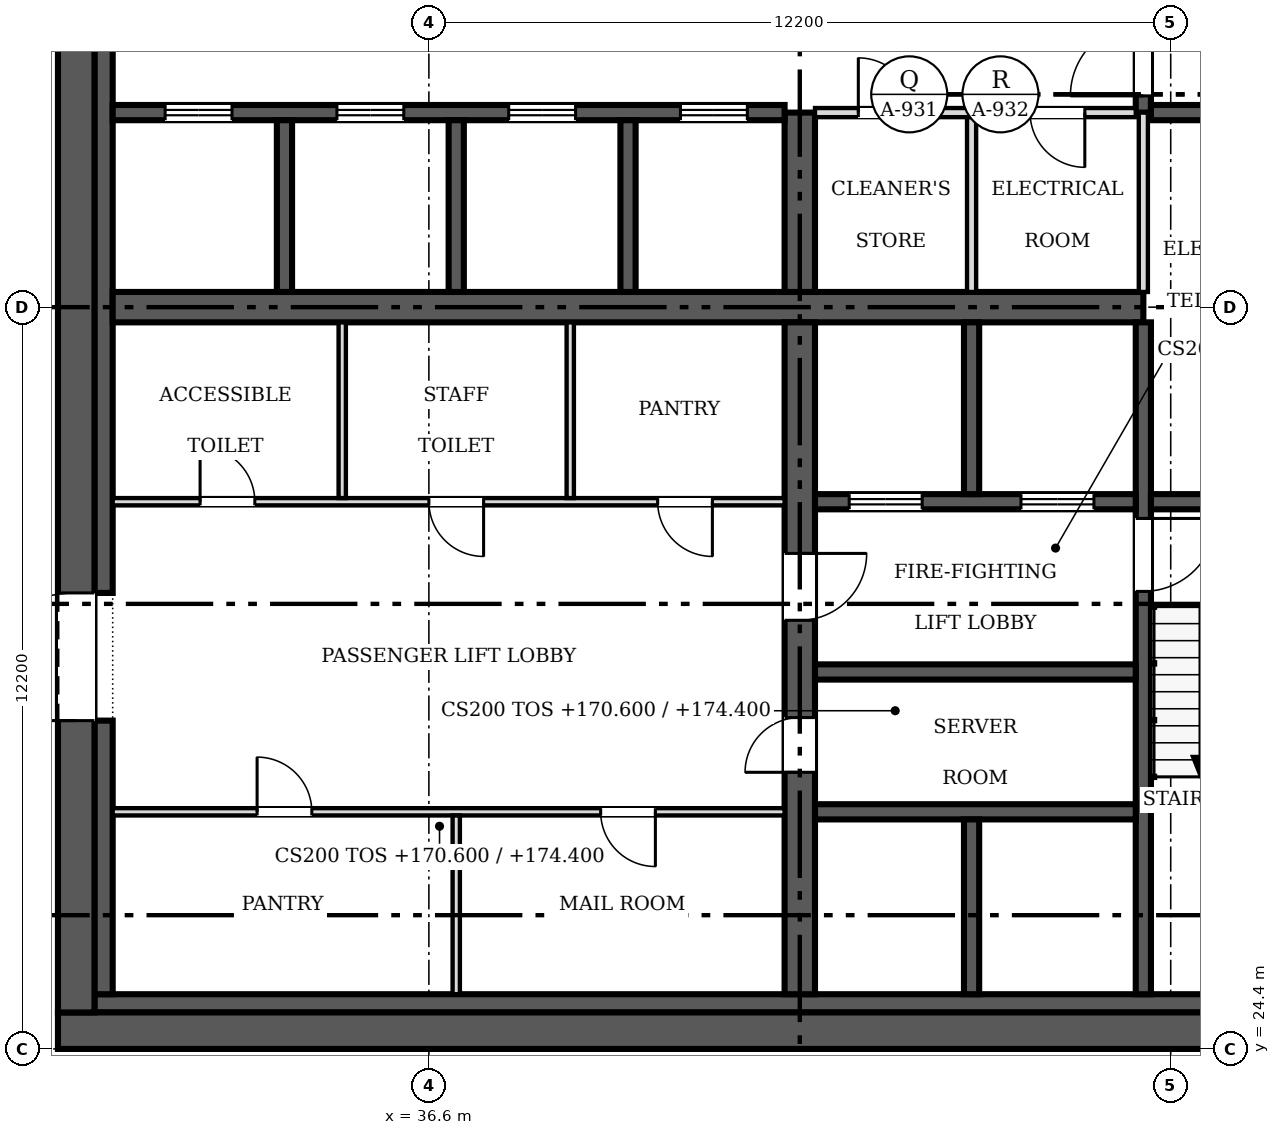
"""IFC4 building model, lengths in metres.
Left out: names, types, materials, properties, quantities, classifications, styles, units other than length and angle.
Written with IfcOpenShell. Run it as: python <this file> out.ifc"""

import sys

from ifc_helpers import new_model, si_unit, direction, frame, frame_2d, origin, place, context, subcontext, project, spatial, rectangle, extrude, source, transform, mapped, element, fill, save


model = new_model("IFC4")
c1 = context("Model", 3, precision=1e-05, world=origin(), true_north=direction((0.0, 1.0)))
c2 = subcontext(c1, "Body", "Model", "MODEL_VIEW")
j1 = project(units=[si_unit("LENGTHUNIT", "METRE"), si_unit("PLANEANGLEUNIT", "RADIAN")], contexts=[c1])
p1 = place(None, origin())
s1 = spatial("IfcSite", under=j1, at=p1, CompositionType="ELEMENT")
p2 = place(p1, origin())
s2 = spatial("IfcBuilding", under=s1, at=p2, CompositionType="ELEMENT")
p3 = place(p2, frame((0.0, 0.0, 170.6)))
s3 = spatial("IfcBuildingStorey", under=s2, at=p3, CompositionType="ELEMENT", Elevation=170.6)
p4 = place(p3, frame((54.9, 24.7, 0.0), z_axis=(0.0, 0.0, 1.0), x_axis=(-1.0, 0.0, 0.0)))
e1 = element("IfcWall", 1, at=p4, inside=s3, PredefinedType="SHEAR", context=c2, shape_type="SweptSolid", body=[
    extrude(rectangle(XDim=24.4, YDim=0.6, at=frame_2d((12.2, 0.0))), origin(), (0.0, 0.0, 1.0), 3.8),
])
m1 = source(origin(), c2, "Body", "SweptSolid", [
    extrude(rectangle(XDim=1.2, YDim=2.1, at=frame_2d((0.6, 1.05))), frame((0.0, 0.31, 0.0), z_axis=(0.0, -1.0, 0.0), x_axis=(1.0, 0.0, 0.0)), (0.0, 0.0, 1.0), 0.62),
])
p5 = place(p4, frame((1.5, 0.0, 0.0)))
e2 = element("IfcOpeningElement", 2, at=p5, cuts=e1, PredefinedType="OPENING", context=c2, shape_type="MappedRepresentation", body=[
    mapped(m1, transform((0.0, 0.0, 0.0), scale=1.0)),
])
p6 = place(p3, frame((30.8, 25.0, 0.0), z_axis=(0.0, 0.0, 1.0), x_axis=(0.0, 1.0, 0.0)))
e3 = element("IfcWall", 3, at=p6, inside=s3, PredefinedType="SHEAR", context=c2, shape_type="SweptSolid", body=[
    extrude(rectangle(XDim=23.2, YDim=0.6, at=frame_2d((11.6, 0.0))), origin(), (0.0, 0.0, 1.0), 3.8),
])
m2 = source(origin(), c2, "Body", "SweptSolid", [
    extrude(rectangle(XDim=2.1, YDim=2.4, at=frame_2d((1.05, 1.2))), frame((0.0, 0.31, 0.0), z_axis=(0.0, -1.0, 0.0), x_axis=(1.0, 0.0, 0.0)), (0.0, 0.0, 1.0), 0.62),
])
p7 = place(p6, frame((4.8, 0.0, 0.0)))
e4 = element("IfcOpeningElement", 4, at=p7, cuts=e3, PredefinedType="OPENING", context=c2, shape_type="MappedRepresentation", body=[
    mapped(m2, transform((0.0, 0.0, 0.0), scale=1.0)),
])
p8 = place(p6, frame((16.3, 0.0, 0.0)))
e5 = element("IfcOpeningElement", 5, at=p8, cuts=e3, PredefinedType="OPENING", context=c2, shape_type="MappedRepresentation", body=[
    mapped(m2, transform((0.0, 0.0, 0.0), scale=1.0)),
])
p9 = place(p3, frame((31.1, 25.15, 0.0), z_axis=(0.0, 0.0, 1.0), x_axis=(1.0, 0.0, 0.0)))
e6 = element("IfcWall", 6, at=p9, inside=s3, PredefinedType="SOLIDWALL", context=c2, shape_type="SweptSolid", body=[
    extrude(rectangle(XDim=21.1, YDim=0.3, at=frame_2d((10.55, 0.0))), origin(), (0.0, 0.0, 1.0), 3.8),
])
p10 = place(p3, frame((31.25, 25.3, 0.0), z_axis=(0.0, 0.0, 1.0), x_axis=(0.0, 1.0, 0.0)))
e7 = element("IfcWall", 7, at=p10, inside=s3, PredefinedType="SOLIDWALL", context=c2, shape_type="SweptSolid", body=[
    extrude(rectangle(XDim=4.5, YDim=0.3, at=frame_2d((2.25, 0.0))), origin(), (0.0, 0.0, 1.0), 3.8),
])
p11 = place(p3, frame((31.25, 31.9, 0.0), z_axis=(0.0, 0.0, 1.0), x_axis=(0.0, 1.0, 0.0)))
e8 = element("IfcWall", 8, at=p11, inside=s3, PredefinedType="SOLIDWALL", context=c2, shape_type="SweptSolid", body=[
    extrude(rectangle(XDim=9.4, YDim=0.3, at=frame_2d((4.7, 0.0))), origin(), (0.0, 0.0, 1.0), 3.8),
])
p12 = place(p3, frame((31.4, 36.6, 0.0), z_axis=(0.0, 0.0, 1.0), x_axis=(1.0, 0.0, 0.0)))
e9 = element("IfcWall", 9, at=p12, inside=s3, PredefinedType="SHEAR", context=c2, shape_type="SweptSolid", body=[
    extrude(rectangle(XDim=16.95, YDim=0.5, at=frame_2d((8.475, 0.0))), origin(), (0.0, 0.0, 1.0), 3.8),
])
p13 = place(p3, frame((42.7, 36.35, 0.0), z_axis=(0.0, 0.0, 1.0), x_axis=(0.0, -1.0, 0.0)))
e10 = element("IfcWall", 10, at=p13, inside=s3, PredefinedType="SHEAR", context=c2, shape_type="SweptSolid", body=[
    extrude(rectangle(XDim=11.05, YDim=0.5, at=frame_2d((5.525, 0.0))), origin(), (0.0, 0.0, 1.0), 3.8),
])
m3 = source(origin(), c2, "Body", "SweptSolid", [
    extrude(rectangle(XDim=0.9, YDim=2.1, at=frame_2d((0.45, 1.05))), frame((0.0, 0.26, 0.0), z_axis=(0.0, -1.0, 0.0), x_axis=(1.0, 0.0, 0.0)), (0.0, 0.0, 1.0), 0.52),
])
p14 = place(p13, frame((6.5, 0.0, 0.0)))
e11 = element("IfcOpeningElement", 11, at=p14, cuts=e10, PredefinedType="OPENING", context=c2, shape_type="MappedRepresentation", body=[
    mapped(m3, transform((0.0, 0.0, 0.0), scale=1.0)),
])
m4 = source(origin(), c2, "Body", "SweptSolid", [
    extrude(rectangle(XDim=1.1, YDim=2.1, at=frame_2d((0.55, 1.05))), frame((0.0, 0.26, 0.0), z_axis=(0.0, -1.0, 0.0), x_axis=(1.0, 0.0, 0.0)), (0.0, 0.0, 1.0), 0.52),
])
p15 = place(p13, frame((3.8, 0.0, 0.0)))
e12 = element("IfcOpeningElement", 12, at=p15, cuts=e10, PredefinedType="OPENING", context=c2, shape_type="MappedRepresentation", body=[
    mapped(m4, transform((0.0, 0.0, 0.0), scale=1.0)),
])
p16 = place(p3, frame((42.7, 36.85, 0.0), z_axis=(0.0, 0.0, 1.0), x_axis=(0.0, 1.0, 0.0)))
e13 = element("IfcWall", 13, at=p16, inside=s3, PredefinedType="SHEAR", context=c2, shape_type="SweptSolid", body=[
    extrude(rectangle(XDim=2.95, YDim=0.5, at=frame_2d((1.475, 0.0))), origin(), (0.0, 0.0, 1.0), 3.8),
])
p17 = place(p3, frame((31.4, 39.8, 0.0), z_axis=(0.0, 0.0, 1.0), x_axis=(1.0, 0.0, 0.0)))
e14 = element("IfcWall", 14, at=p17, inside=s3, PredefinedType="SOLIDWALL", context=c2, shape_type="SweptSolid", body=[
    extrude(rectangle(XDim=11.05, YDim=0.25, at=frame_2d((5.525, 0.0))), origin(), (0.0, 0.0, 1.0), 3.8),
])
m5 = source(origin(), c2, "Body", "SweptSolid", [
    extrude(rectangle(XDim=1.1, YDim=2.1, at=frame_2d((0.55, 1.05))), frame((0.0, 0.135, 0.0), z_axis=(0.0, -1.0, 0.0), x_axis=(1.0, 0.0, 0.0)), (0.0, 0.0, 1.0), 0.27),
])
p18 = place(p17, frame((0.863, 0.0, 0.0)))
e15 = element("IfcOpeningElement", 15, at=p18, cuts=e14, PredefinedType="OPENING", context=c2, shape_type="MappedRepresentation", body=[
    mapped(m5, transform((0.0, 0.0, 0.0), scale=1.0)),
])
p19 = place(p17, frame((3.688, 0.0, 0.0)))
e16 = element("IfcOpeningElement", 16, at=p19, cuts=e14, PredefinedType="OPENING", context=c2, shape_type="MappedRepresentation", body=[
    mapped(m5, transform((0.0, 0.0, 0.0), scale=1.0)),
])
p20 = place(p17, frame((6.512, 0.0, 0.0)))
e17 = element("IfcOpeningElement", 17, at=p20, cuts=e14, PredefinedType="OPENING", context=c2, shape_type="MappedRepresentation", body=[
    mapped(m5, transform((0.0, 0.0, 0.0), scale=1.0)),
])
p21 = place(p17, frame((9.337, 0.0, 0.0)))
e18 = element("IfcOpeningElement", 18, at=p21, cuts=e14, PredefinedType="OPENING", context=c2, shape_type="MappedRepresentation", body=[
    mapped(m5, transform((0.0, 0.0, 0.0), scale=1.0)),
])
p22 = place(p3, frame((48.35, 36.35, 0.0), z_axis=(0.0, 0.0, 1.0), x_axis=(0.0, -1.0, 0.0)))
e19 = element("IfcWall", 19, at=p22, inside=s3, PredefinedType="SOLIDWALL", context=c2, shape_type="SweptSolid", body=[
    extrude(rectangle(XDim=11.05, YDim=0.25, at=frame_2d((5.525, 0.0))), origin(), (0.0, 0.0, 1.0), 3.8),
])
m6 = source(origin(), c2, "Body", "SweptSolid", [
    extrude(rectangle(XDim=1.2, YDim=2.1, at=frame_2d((0.6, 1.05))), frame((0.0, 0.135, 0.0), z_axis=(0.0, -1.0, 0.0), x_axis=(1.0, 0.0, 0.0)), (0.0, 0.0, 1.0), 0.27),
])
p23 = place(p22, frame((3.225, 0.0, 0.0)))
e20 = element("IfcOpeningElement", 20, at=p23, cuts=e19, PredefinedType="OPENING", context=c2, shape_type="MappedRepresentation", body=[
    mapped(m6, transform((0.0, 0.0, 0.0), scale=1.0)),
])
p24 = place(p3, frame((48.225, 33.4, 0.0), z_axis=(0.0, 0.0, 1.0), x_axis=(-1.0, 0.0, 0.0)))
e21 = element("IfcWall", 21, at=p24, inside=s3, PredefinedType="SOLIDWALL", context=c2, shape_type="SweptSolid", body=[
    extrude(rectangle(XDim=5.275, YDim=0.25, at=frame_2d((2.638, 0.0))), origin(), (0.0, 0.0, 1.0), 3.8),
])
p25 = place(p24, frame((3.512, 0.0, 0.0)))
e22 = element("IfcOpeningElement", 22, at=p25, cuts=e21, PredefinedType="OPENING", context=c2, shape_type="MappedRepresentation", body=[
    mapped(m6, transform((0.0, 0.0, 0.0), scale=1.0)),
])
p26 = place(p24, frame((0.688, 0.0, 0.0)))
e23 = element("IfcOpeningElement", 23, at=p26, cuts=e21, PredefinedType="OPENING", context=c2, shape_type="MappedRepresentation", body=[
    mapped(m6, transform((0.0, 0.0, 0.0), scale=1.0)),
])
p27 = place(p3, frame((48.475, 33.4, 0.0), z_axis=(0.0, 0.0, 1.0), x_axis=(1.0, 0.0, 0.0)))
e24 = element("IfcWall", 24, at=p27, inside=s3, PredefinedType="SOLIDWALL", context=c2, shape_type="SweptSolid", body=[
    extrude(rectangle(XDim=3.525, YDim=0.25, at=frame_2d((1.762, 0.0))), origin(), (0.0, 0.0, 1.0), 3.8),
])
p28 = place(p3, frame((48.35, 47.9, 0.0), z_axis=(0.0, 0.0, 1.0), x_axis=(0.0, -1.0, 0.0)))
e25 = element("IfcWall", 25, at=p28, inside=s3, PredefinedType="SOLIDWALL", context=c2, shape_type="SweptSolid", body=[
    extrude(rectangle(XDim=8.1, YDim=0.25, at=frame_2d((4.05, 0.0))), origin(), (0.0, 0.0, 1.0), 3.8),
])
p29 = place(p28, frame((6.625, 0.0, 0.0)))
e26 = element("IfcOpeningElement", 26, at=p29, cuts=e25, PredefinedType="OPENING", context=c2, shape_type="MappedRepresentation", body=[
    mapped(m6, transform((0.0, 0.0, 0.0), scale=1.0)),
])
for number, where, z_axis, x_axis in (
    (27, (42.95, 28.3, 0.0), (0.0, 0.0, 1.0), (1.0, 0.0, 0.0)),
    (28, (42.95, 30.6, 0.0), (0.0, 0.0, 1.0), (1.0, 0.0, 0.0)),
):
    element("IfcWall", number, at=place(p3, frame(where, z_axis=z_axis, x_axis=x_axis)), inside=s3, PredefinedType="SOLIDWALL", context=c2, shape_type="SweptSolid", body=[
        extrude(rectangle(XDim=5.275, YDim=0.25, at=frame_2d((2.638, 0.0))), origin(), (0.0, 0.0, 1.0), 3.8),
    ])
p30 = place(p3, frame((48.475, 39.8, 0.0), z_axis=(0.0, 0.0, 1.0), x_axis=(1.0, 0.0, 0.0)))
e29 = element("IfcWall", 29, at=p30, inside=s3, PredefinedType="SOLIDWALL", context=c2, shape_type="SweptSolid", body=[
    extrude(rectangle(XDim=3.4, YDim=0.25, at=frame_2d((1.7, 0.0))), origin(), (0.0, 0.0, 1.0), 3.8),
])
for number, where, z_axis, x_axis in (
    (30, (34.225, 36.85, 0.0), (0.0, 0.0, 1.0), (0.0, 1.0, 0.0)),
    (31, (37.05, 36.85, 0.0), (0.0, 0.0, 1.0), (0.0, 1.0, 0.0)),
    (32, (39.875, 36.85, 0.0), (0.0, 0.0, 1.0), (0.0, 1.0, 0.0)),
):
    element("IfcWall", number, at=place(p3, frame(where, z_axis=z_axis, x_axis=x_axis)), inside=s3, PredefinedType="SOLIDWALL", context=c2, shape_type="SweptSolid", body=[
        extrude(rectangle(XDim=2.825, YDim=0.25, at=frame_2d((1.413, 0.0))), origin(), (0.0, 0.0, 1.0), 3.8),
    ])
p31 = place(p3, frame((45.525, 33.525, 0.0), z_axis=(0.0, 0.0, 1.0), x_axis=(0.0, 1.0, 0.0)))
e33 = element("IfcWall", 33, at=p31, inside=s3, PredefinedType="SOLIDWALL", context=c2, shape_type="SweptSolid", body=[
    extrude(rectangle(XDim=2.825, YDim=0.25, at=frame_2d((1.413, 0.0))), origin(), (0.0, 0.0, 1.0), 3.8),
])
p32 = place(p3, frame((45.525, 25.3, 0.0), z_axis=(0.0, 0.0, 1.0), x_axis=(0.0, 1.0, 0.0)))
e34 = element("IfcWall", 34, at=p32, inside=s3, PredefinedType="SOLIDWALL", context=c2, shape_type="SweptSolid", body=[
    extrude(rectangle(XDim=2.875, YDim=0.25, at=frame_2d((1.438, 0.0))), origin(), (0.0, 0.0, 1.0), 3.8),
])
p33 = place(p3, frame((42.45, 28.3, 0.0), z_axis=(0.0, 0.0, 1.0), x_axis=(-1.0, 0.0, 0.0)))
e35 = element("IfcWall", 35, at=p33, inside=s3, PredefinedType="PARTITIONING", context=c2, shape_type="SweptSolid", body=[
    extrude(rectangle(XDim=11.05, YDim=0.12, at=frame_2d((5.525, 0.0))), origin(), (0.0, 0.0, 1.0), 3.6),
])
m7 = source(origin(), c2, "Body", "SweptSolid", [
    extrude(rectangle(XDim=0.9, YDim=2.1, at=frame_2d((0.45, 1.05))), frame((0.0, 0.07, 0.0), z_axis=(0.0, -1.0, 0.0), x_axis=(1.0, 0.0, 0.0)), (0.0, 0.0, 1.0), 0.14),
])
p34 = place(p33, frame((7.775, 0.0, 0.0)))
e36 = element("IfcOpeningElement", 36, at=p34, cuts=e35, PredefinedType="OPENING", context=c2, shape_type="MappedRepresentation", body=[
    mapped(m7, transform((0.0, 0.0, 0.0), scale=1.0)),
])
p35 = place(p33, frame((2.125, 0.0, 0.0)))
e37 = element("IfcOpeningElement", 37, at=p35, cuts=e35, PredefinedType="OPENING", context=c2, shape_type="MappedRepresentation", body=[
    mapped(m7, transform((0.0, 0.0, 0.0), scale=1.0)),
])
p36 = place(p3, frame((31.4, 33.4, 0.0), z_axis=(0.0, 0.0, 1.0), x_axis=(1.0, 0.0, 0.0)))
e38 = element("IfcWall", 38, at=p36, inside=s3, PredefinedType="PARTITIONING", context=c2, shape_type="SweptSolid", body=[
    extrude(rectangle(XDim=11.05, YDim=0.12, at=frame_2d((5.525, 0.0))), origin(), (0.0, 0.0, 1.0), 3.6),
])
p37 = place(p36, frame((1.438, 0.0, 0.0)))
e39 = element("IfcOpeningElement", 39, at=p37, cuts=e38, PredefinedType="OPENING", context=c2, shape_type="MappedRepresentation", body=[
    mapped(m7, transform((0.0, 0.0, 0.0), scale=1.0)),
])
p38 = place(p36, frame((5.2, 0.0, 0.0)))
e40 = element("IfcOpeningElement", 40, at=p38, cuts=e38, PredefinedType="OPENING", context=c2, shape_type="MappedRepresentation", body=[
    mapped(m7, transform((0.0, 0.0, 0.0), scale=1.0)),
])
p39 = place(p36, frame((8.962, 0.0, 0.0)))
e41 = element("IfcOpeningElement", 41, at=p39, cuts=e38, PredefinedType="OPENING", context=c2, shape_type="MappedRepresentation", body=[
    mapped(m7, transform((0.0, 0.0, 0.0), scale=1.0)),
])
p40 = place(p3, frame((48.225, 39.8, 0.0), z_axis=(0.0, 0.0, 1.0), x_axis=(-1.0, 0.0, 0.0)))
e42 = element("IfcWall", 42, at=p40, inside=s3, PredefinedType="PARTITIONING", context=c2, shape_type="SweptSolid", body=[
    extrude(rectangle(XDim=5.275, YDim=0.15, at=frame_2d((2.638, 0.0))), origin(), (0.0, 0.0, 1.0), 3.6),
])
m8 = source(origin(), c2, "Body", "SweptSolid", [
    extrude(rectangle(XDim=0.9, YDim=2.1, at=frame_2d((0.45, 1.05))), frame((0.0, 0.085, 0.0), z_axis=(0.0, -1.0, 0.0), x_axis=(1.0, 0.0, 0.0)), (0.0, 0.0, 1.0), 0.17),
])
p41 = place(p40, frame((3.663, 0.0, 0.0)))
e43 = element("IfcOpeningElement", 43, at=p41, cuts=e42, PredefinedType="OPENING", context=c2, shape_type="MappedRepresentation", body=[
    mapped(m8, transform((0.0, 0.0, 0.0), scale=1.0)),
])
p42 = place(p40, frame((0.837, 0.0, 0.0)))
e44 = element("IfcOpeningElement", 44, at=p42, cuts=e42, PredefinedType="OPENING", context=c2, shape_type="MappedRepresentation", body=[
    mapped(m8, transform((0.0, 0.0, 0.0), scale=1.0)),
])
p43 = place(p3, frame((45.525, 36.85, 0.0), z_axis=(0.0, 0.0, 1.0), x_axis=(0.0, 1.0, 0.0)))
e45 = element("IfcWall", 45, at=p43, inside=s3, PredefinedType="PARTITIONING", context=c2, shape_type="SweptSolid", body=[
    extrude(rectangle(XDim=2.875, YDim=0.15, at=frame_2d((1.438, 0.0))), origin(), (0.0, 0.0, 1.0), 3.6),
])
p44 = place(p3, frame((48.35, 36.85, 0.0), z_axis=(0.0, 0.0, 1.0), x_axis=(0.0, 1.0, 0.0)))
e46 = element("IfcWall", 46, at=p44, inside=s3, PredefinedType="PARTITIONING", context=c2, shape_type="SweptSolid", body=[
    extrude(rectangle(XDim=2.95, YDim=0.15, at=frame_2d((1.475, 0.0))), origin(), (0.0, 0.0, 1.0), 3.6),
])
for number, where, z_axis, x_axis in (
    (47, (35.175, 33.46, 0.0), (0.0, 0.0, 1.0), (0.0, 1.0, 0.0)),
    (48, (38.925, 33.46, 0.0), (0.0, 0.0, 1.0), (0.0, 1.0, 0.0)),
):
    element("IfcWall", number, at=place(p3, frame(where, z_axis=z_axis, x_axis=x_axis)), inside=s3, PredefinedType="PARTITIONING", context=c2, shape_type="SweptSolid", body=[
        extrude(rectangle(XDim=2.89, YDim=0.12, at=frame_2d((1.445, 0.0))), origin(), (0.0, 0.0, 1.0), 3.6),
    ])
p45 = place(p3, frame((37.05, 25.3, 0.0), z_axis=(0.0, 0.0, 1.0), x_axis=(0.0, 1.0, 0.0)))
e49 = element("IfcWall", 49, at=p45, inside=s3, PredefinedType="PARTITIONING", context=c2, shape_type="SweptSolid", body=[
    extrude(rectangle(XDim=2.94, YDim=0.12, at=frame_2d((1.47, 0.0))), origin(), (0.0, 0.0, 1.0), 3.6),
])
m9 = source(origin(), c2, "Body", "SweptSolid", [
    extrude(rectangle(XDim=2.1, YDim=2.4, at=frame_2d((1.05, 1.2))), frame((0.0, 0.025, 0.0), z_axis=(0.0, -1.0, 0.0), x_axis=(1.0, 0.0, 0.0)), (0.0, 0.0, 1.0), 0.05),
])
p46 = place(p7, origin())
e50 = element("IfcDoor", 50, at=p46, inside=s3, OperationType="DOUBLE_DOOR_SINGLE_SWING", PredefinedType="DOOR", context=c2, shape_type="MappedRepresentation", body=[
    mapped(m9, transform((0.0, 0.0, 0.0), scale=1.0)),
])
fill(e4, e50)
m10 = source(origin(), c2, "Body", "SweptSolid", [
    extrude(rectangle(XDim=0.9, YDim=2.1, at=frame_2d((0.45, 1.05))), frame((0.0, 0.025, 0.0), z_axis=(0.0, -1.0, 0.0), x_axis=(1.0, 0.0, 0.0)), (0.0, 0.0, 1.0), 0.05),
])
p47 = place(p14, origin())
e51 = element("IfcDoor", 51, at=p47, inside=s3, OperationType="SINGLE_SWING_RIGHT", PredefinedType="DOOR", context=c2, shape_type="MappedRepresentation", body=[
    mapped(m10, transform((0.0, 0.0, 0.0), scale=1.0)),
])
fill(e11, e51)
m11 = source(origin(), c2, "Body", "SweptSolid", [
    extrude(rectangle(XDim=1.1, YDim=2.1, at=frame_2d((0.55, 1.05))), frame((0.0, 0.025, 0.0), z_axis=(0.0, -1.0, 0.0), x_axis=(1.0, 0.0, 0.0)), (0.0, 0.0, 1.0), 0.05),
])
p48 = place(p15, origin())
e52 = element("IfcDoor", 52, at=p48, inside=s3, OperationType="SINGLE_SWING_LEFT", PredefinedType="DOOR", context=c2, shape_type="MappedRepresentation", body=[
    mapped(m11, transform((0.0, 0.0, 0.0), scale=1.0)),
])
fill(e12, e52)
p49 = place(p18, origin())
e53 = element("IfcDoor", 53, at=p49, inside=s3, OperationType="DOUBLE_DOOR_SLIDING", PredefinedType="DOOR", context=c2, shape_type="MappedRepresentation", body=[
    mapped(m11, transform((0.0, 0.0, 0.0), scale=1.0)),
])
fill(e15, e53)
p50 = place(p19, origin())
e54 = element("IfcDoor", 54, at=p50, inside=s3, OperationType="DOUBLE_DOOR_SLIDING", PredefinedType="DOOR", context=c2, shape_type="MappedRepresentation", body=[
    mapped(m11, transform((0.0, 0.0, 0.0), scale=1.0)),
])
fill(e16, e54)
p51 = place(p20, origin())
e55 = element("IfcDoor", 55, at=p51, inside=s3, OperationType="DOUBLE_DOOR_SLIDING", PredefinedType="DOOR", context=c2, shape_type="MappedRepresentation", body=[
    mapped(m11, transform((0.0, 0.0, 0.0), scale=1.0)),
])
fill(e17, e55)
p52 = place(p21, origin())
e56 = element("IfcDoor", 56, at=p52, inside=s3, OperationType="DOUBLE_DOOR_SLIDING", PredefinedType="DOOR", context=c2, shape_type="MappedRepresentation", body=[
    mapped(m11, transform((0.0, 0.0, 0.0), scale=1.0)),
])
fill(e18, e56)
m12 = source(origin(), c2, "Body", "SweptSolid", [
    extrude(rectangle(XDim=1.2, YDim=2.1, at=frame_2d((0.6, 1.05))), frame((0.0, 0.025, 0.0), z_axis=(0.0, -1.0, 0.0), x_axis=(1.0, 0.0, 0.0)), (0.0, 0.0, 1.0), 0.05),
])
p53 = place(p23, origin())
e57 = element("IfcDoor", 57, at=p53, inside=s3, OperationType="SINGLE_SWING_LEFT", PredefinedType="DOOR", context=c2, shape_type="MappedRepresentation", body=[
    mapped(m12, transform((0.0, 0.0, 0.0), scale=1.0)),
])
fill(e20, e57)
p54 = place(p25, origin())
e58 = element("IfcDoor", 58, at=p54, inside=s3, OperationType="DOUBLE_DOOR_SLIDING", PredefinedType="DOOR", context=c2, shape_type="MappedRepresentation", body=[
    mapped(m12, transform((0.0, 0.0, 0.0), scale=1.0)),
])
fill(e22, e58)
p55 = place(p26, origin())
e59 = element("IfcDoor", 59, at=p55, inside=s3, OperationType="DOUBLE_DOOR_SLIDING", PredefinedType="DOOR", context=c2, shape_type="MappedRepresentation", body=[
    mapped(m12, transform((0.0, 0.0, 0.0), scale=1.0)),
])
fill(e23, e59)
p56 = place(p29, origin())
e60 = element("IfcDoor", 60, at=p56, inside=s3, OperationType="SINGLE_SWING_RIGHT", PredefinedType="DOOR", context=c2, shape_type="MappedRepresentation", body=[
    mapped(m12, transform((0.0, 0.0, 0.0), scale=1.0)),
])
fill(e26, e60)
p57 = place(p34, origin())
e61 = element("IfcDoor", 61, at=p57, inside=s3, OperationType="SINGLE_SWING_RIGHT", PredefinedType="DOOR", context=c2, shape_type="MappedRepresentation", body=[
    mapped(m10, transform((0.0, 0.0, 0.0), scale=1.0)),
])
fill(e36, e61)
p58 = place(p35, origin())
e62 = element("IfcDoor", 62, at=p58, inside=s3, OperationType="SINGLE_SWING_LEFT", PredefinedType="DOOR", context=c2, shape_type="MappedRepresentation", body=[
    mapped(m10, transform((0.0, 0.0, 0.0), scale=1.0)),
])
fill(e37, e62)
p59 = place(p37, origin())
e63 = element("IfcDoor", 63, at=p59, inside=s3, OperationType="SINGLE_SWING_LEFT", PredefinedType="DOOR", context=c2, shape_type="MappedRepresentation", body=[
    mapped(m10, transform((0.0, 0.0, 0.0), scale=1.0)),
])
fill(e39, e63)
p60 = place(p38, origin())
e64 = element("IfcDoor", 64, at=p60, inside=s3, OperationType="SINGLE_SWING_RIGHT", PredefinedType="DOOR", context=c2, shape_type="MappedRepresentation", body=[
    mapped(m10, transform((0.0, 0.0, 0.0), scale=1.0)),
])
fill(e40, e64)
p61 = place(p39, origin())
e65 = element("IfcDoor", 65, at=p61, inside=s3, OperationType="SINGLE_SWING_RIGHT", PredefinedType="DOOR", context=c2, shape_type="MappedRepresentation", body=[
    mapped(m10, transform((0.0, 0.0, 0.0), scale=1.0)),
])
fill(e41, e65)
p62 = place(p41, origin())
e66 = element("IfcDoor", 66, at=p62, inside=s3, OperationType="SINGLE_SWING_RIGHT", PredefinedType="DOOR", context=c2, shape_type="MappedRepresentation", body=[
    mapped(m10, transform((0.0, 0.0, 0.0), scale=1.0)),
])
fill(e43, e66)
p63 = place(p42, origin())
e67 = element("IfcDoor", 67, at=p63, inside=s3, OperationType="SINGLE_SWING_LEFT", PredefinedType="DOOR", context=c2, shape_type="MappedRepresentation", body=[
    mapped(m10, transform((0.0, 0.0, 0.0), scale=1.0)),
])
fill(e44, e67)
save(model, sys.argv[1])
